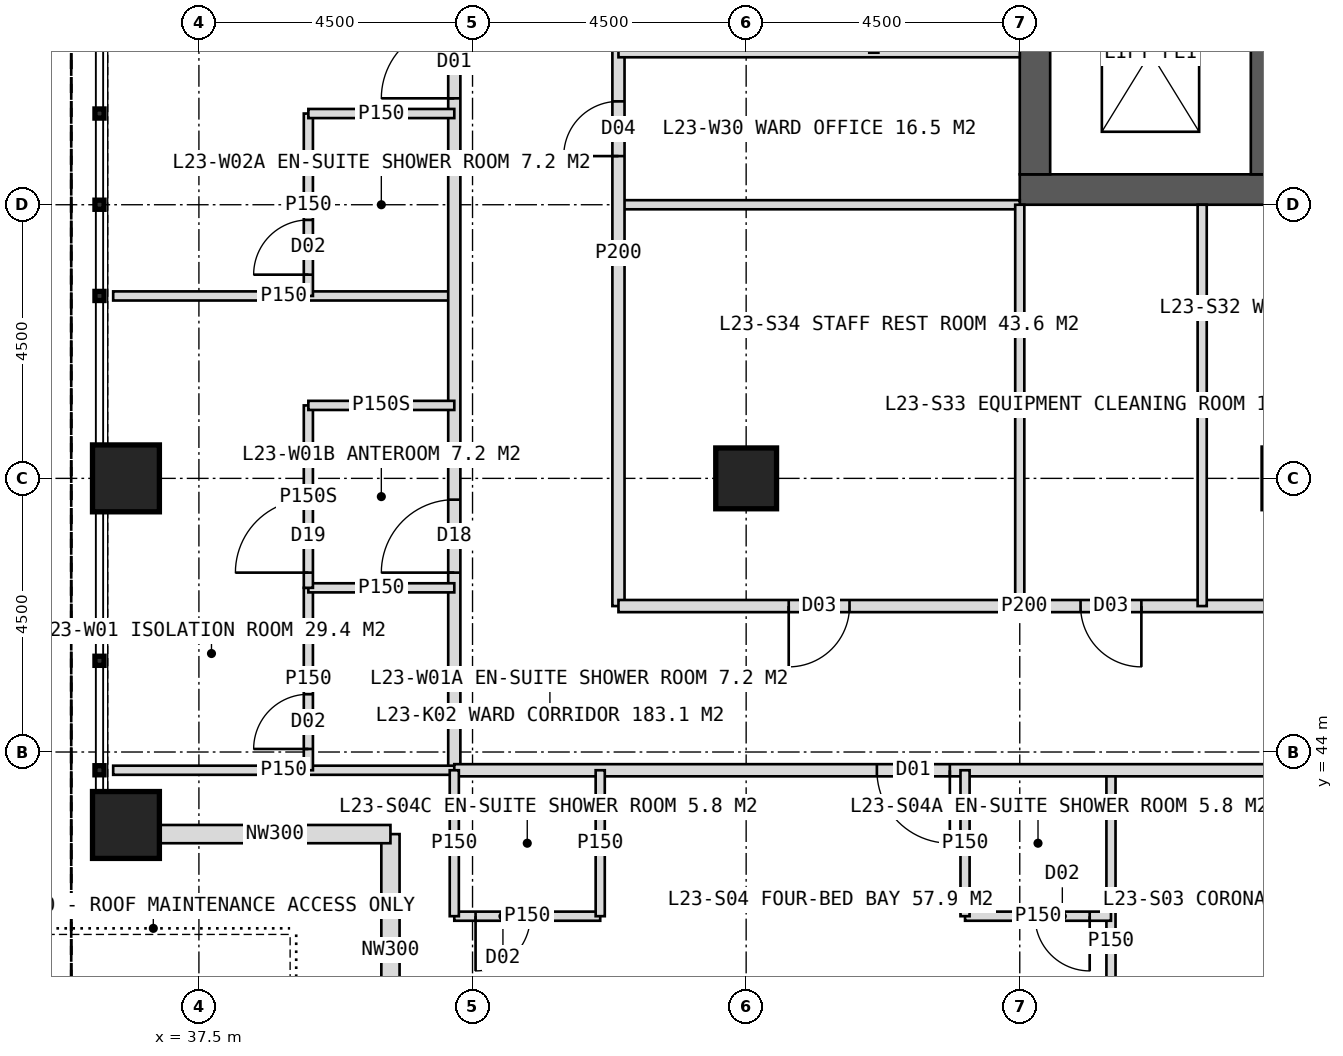
"""IFC4 building model, lengths in metres.
Left out: names, types, materials, properties, quantities, classifications, styles, units other than length and angle.
Written with IfcOpenShell. Run it as: python <this file> out.ifc"""

import sys

from ifc_helpers import new_model, si_unit, direction, frame, frame_2d, origin, origin_2d, place, context, subcontext, project, spatial, rectangle, hollow_rectangle, extrude, element, fill, save


model = new_model("IFC4")
c1 = context("Model", 3, precision=1e-05, world=origin(), true_north=direction((0.0, 1.0)))
c2 = subcontext(c1, "Body", "Model", "MODEL_VIEW")
j1 = project(units=[si_unit("LENGTHUNIT", "METRE"), si_unit("PLANEANGLEUNIT", "RADIAN")], contexts=[c1])
p1 = place(None, origin())
s1 = spatial("IfcSite", under=j1, at=p1, CompositionType="ELEMENT")
p2 = place(p1, origin())
s2 = spatial("IfcBuilding", under=s1, at=p2, CompositionType="ELEMENT")
p3 = place(p2, frame((0.0, 0.0, 100.0)))
s3 = spatial("IfcBuildingStorey", under=s2, at=p3, CompositionType="ELEMENT", Elevation=100.0)
p4 = place(p3, frame((51.0, 53.25, 0.0), z_axis=(0.0, 0.0, 1.0), x_axis=(1.0, 0.0, 0.0)))
e1 = element("IfcWall", 1, at=p4, inside=s3, PredefinedType="SHEAR", context=c2, shape_type="SweptSolid", body=[
    extrude(rectangle(XDim=18.0, YDim=0.5, at=frame_2d((9.0, 0.0))), origin(), (0.0, 0.0, 1.0), 4.0),
])
p5 = place(p4, frame((8.1, 0.0, 0.0)))
e2 = element("IfcOpeningElement", 2, at=p5, cuts=e1, PredefinedType="OPENING", context=c2, shape_type="SweptSolid", body=[
    extrude(rectangle(XDim=1.8, YDim=2.2, at=frame_2d((0.9, 1.1))), frame((0.0, 0.26, 0.0), z_axis=(0.0, -1.0, 0.0), x_axis=(1.0, 0.0, 0.0)), (0.0, 0.0, 1.0), 0.52),
])
p6 = place(p3, frame((51.25, 53.5, 0.0), z_axis=(0.0, 0.0, 1.0), x_axis=(0.0, 1.0, 0.0)))
e3 = element("IfcWall", 3, at=p6, inside=s3, PredefinedType="SHEAR", context=c2, shape_type="SweptSolid", body=[
    extrude(rectangle(XDim=17.0, YDim=0.5, at=frame_2d((8.5, 0.0))), origin(), (0.0, 0.0, 1.0), 4.0),
])
p7 = place(p6, frame((6.0, 0.0, 0.0)))
e4 = element("IfcOpeningElement", 4, at=p7, cuts=e3, PredefinedType="OPENING", context=c2, shape_type="SweptSolid", body=[
    extrude(rectangle(XDim=1.5, YDim=2.2, at=frame_2d((0.75, 1.1))), frame((0.0, 0.26, 0.0), z_axis=(0.0, -1.0, 0.0), x_axis=(1.0, 0.0, 0.0)), (0.0, 0.0, 1.0), 0.52),
])
p8 = place(p3, frame((54.95, 53.5, 0.0), z_axis=(0.0, 0.0, 1.0), x_axis=(0.0, 1.0, 0.0)))
e5 = element("IfcWall", 5, at=p8, inside=s3, PredefinedType="SHEAR", context=c2, shape_type="SweptSolid", body=[
    extrude(rectangle(XDim=17.0, YDim=0.3, at=frame_2d((8.5, 0.0))), origin(), (0.0, 0.0, 1.0), 4.0),
])
p9 = place(p3, frame((46.5, 48.5, 0.0), z_axis=(0.0, 0.0, 1.0), x_axis=(1.0, 0.0, 0.0)))
e6 = element("IfcColumn", 6, at=p9, inside=s3, PredefinedType="COLUMN", context=c2, shape_type="SweptSolid", body=[
    extrude(hollow_rectangle(XDim=1.0, YDim=1.0, WallThickness=0.1, at=origin_2d()), origin(), (0.0, 0.0, 1.0), 4.0),
])
for number, where, z_axis, x_axis in (
    (7, (36.3, 42.8, 0.0), (0.0, 0.0, 1.0), (1.0, 0.0, 0.0)),
    (8, (36.3, 48.5, 0.0), (0.0, 0.0, 1.0), (1.0, 0.0, 0.0)),
):
    element("IfcColumn", number, at=place(p3, frame(where, z_axis=z_axis, x_axis=x_axis)), inside=s3, PredefinedType="COLUMN", context=c2, shape_type="SweptSolid", body=[
        extrude(hollow_rectangle(XDim=1.1, YDim=1.1, WallThickness=0.1, at=origin_2d()), origin(), (0.0, 0.0, 1.0), 4.0),
    ])
for number, where, z_axis, x_axis in (
    (9, (40.65, 38.85, 0.0), (0.0, 0.0, 1.0), (0.0, 1.0, 0.0)),
    (10, (40.65, 42.65, 0.0), (0.0, 0.0, 1.0), (-1.0, 0.0, 0.0)),
):
    element("IfcWall", number, at=place(p3, frame(where, z_axis=z_axis, x_axis=x_axis)), inside=s3, PredefinedType="ELEMENTEDWALL", context=c2, shape_type="SweptSolid", body=[
        extrude(rectangle(XDim=3.8, YDim=0.3, at=frame_2d((1.9, 0.0))), origin(), (0.0, 0.0, 1.0), 4.0),
    ])
p10 = place(p3, frame((41.7, 51.5, 0.0), z_axis=(0.0, 0.0, 1.0), x_axis=(-1.0, 0.0, 0.0)))
e11 = element("IfcWall", 11, at=p10, inside=s3, PredefinedType="PARTITIONING", context=c2, shape_type="SweptSolid", body=[
    extrude(rectangle(XDim=5.61, YDim=0.15, at=frame_2d((2.805, 0.0))), origin(), (0.0, 0.0, 1.0), 3.75),
])
p11 = place(p3, frame((41.7, 43.7, 0.0), z_axis=(0.0, 0.0, 1.0), x_axis=(0.0, 1.0, 0.0)))
e12 = element("IfcWall", 12, at=p11, inside=s3, PredefinedType="PARTITIONING", context=c2, shape_type="SweptSolid", body=[
    extrude(rectangle(XDim=36.6, YDim=0.2, at=frame_2d((18.3, 0.0))), origin(), (0.0, 0.0, 1.0), 3.75),
])
p12 = place(p11, frame((3.25, 0.0, 0.0)))
e13 = element("IfcOpeningElement", 13, at=p12, cuts=e12, PredefinedType="OPENING", context=c2, shape_type="SweptSolid", body=[
    extrude(rectangle(XDim=1.2, YDim=2.2, at=frame_2d((0.6, 1.1))), frame((0.0, 0.11, 0.0), z_axis=(0.0, -1.0, 0.0), x_axis=(1.0, 0.0, 0.0)), (0.0, 0.0, 1.0), 0.22),
])
p13 = place(p11, frame((11.05, 0.0, 0.0)))
e14 = element("IfcOpeningElement", 14, at=p13, cuts=e12, PredefinedType="OPENING", context=c2, shape_type="SweptSolid", body=[
    extrude(rectangle(XDim=1.2, YDim=2.2, at=frame_2d((0.6, 1.1))), frame((0.0, 0.11, 0.0), z_axis=(0.0, -1.0, 0.0), x_axis=(1.0, 0.0, 0.0)), (0.0, 0.0, 1.0), 0.22),
])
p14 = place(p11, frame((21.55, 0.0, 0.0)))
e15 = element("IfcOpeningElement", 15, at=p14, cuts=e12, PredefinedType="OPENING", context=c2, shape_type="SweptSolid", body=[
    extrude(rectangle(XDim=1.2, YDim=2.2, at=frame_2d((0.6, 1.1))), frame((0.0, 0.11, 0.0), z_axis=(0.0, -1.0, 0.0), x_axis=(1.0, 0.0, 0.0)), (0.0, 0.0, 1.0), 0.22),
])
p15 = place(p11, frame((32.05, 0.0, 0.0)))
e16 = element("IfcOpeningElement", 16, at=p15, cuts=e12, PredefinedType="OPENING", context=c2, shape_type="SweptSolid", body=[
    extrude(rectangle(XDim=1.2, YDim=2.2, at=frame_2d((0.6, 1.1))), frame((0.0, 0.11, 0.0), z_axis=(0.0, -1.0, 0.0), x_axis=(1.0, 0.0, 0.0)), (0.0, 0.0, 1.0), 0.22),
])
p16 = place(p3, frame((41.7, 43.7, 0.0), z_axis=(0.0, 0.0, 1.0), x_axis=(-1.0, 0.0, 0.0)))
e17 = element("IfcWall", 17, at=p16, inside=s3, PredefinedType="PARTITIONING", context=c2, shape_type="SweptSolid", body=[
    extrude(rectangle(XDim=5.61, YDim=0.15, at=frame_2d((2.805, 0.0))), origin(), (0.0, 0.0, 1.0), 3.75),
])
p17 = place(p3, frame((39.3, 43.7, 0.0), z_axis=(0.0, 0.0, 1.0), x_axis=(0.0, 1.0, 0.0)))
e18 = element("IfcWall", 18, at=p17, inside=s3, PredefinedType="PARTITIONING", context=c2, shape_type="SweptSolid", body=[
    extrude(rectangle(XDim=3.0, YDim=0.15, at=frame_2d((1.5, 0.0))), origin(), (0.0, 0.0, 1.0), 3.75),
])
p18 = place(p17, frame((0.35, 0.0, 0.0)))
e19 = element("IfcOpeningElement", 19, at=p18, cuts=e18, PredefinedType="OPENING", context=c2, shape_type="SweptSolid", body=[
    extrude(rectangle(XDim=0.9, YDim=2.1, at=frame_2d((0.45, 1.05))), frame((0.0, 0.085, 0.0), z_axis=(0.0, -1.0, 0.0), x_axis=(1.0, 0.0, 0.0)), (0.0, 0.0, 1.0), 0.17),
])
p19 = place(p3, frame((41.7, 46.7, 0.0), z_axis=(0.0, 0.0, 1.0), x_axis=(-1.0, 0.0, 0.0)))
e20 = element("IfcWall", 20, at=p19, inside=s3, PredefinedType="PARTITIONING", context=c2, shape_type="SweptSolid", body=[
    extrude(rectangle(XDim=2.4, YDim=0.15, at=frame_2d((1.2, 0.0))), origin(), (0.0, 0.0, 1.0), 3.75),
])
p20 = place(p3, frame((39.3, 46.7, 0.0), z_axis=(0.0, 0.0, 1.0), x_axis=(0.0, 1.0, 0.0)))
e21 = element("IfcWall", 21, at=p20, inside=s3, PredefinedType="PARTITIONING", context=c2, shape_type="SweptSolid", body=[
    extrude(rectangle(XDim=3.0, YDim=0.15, at=frame_2d((1.5, 0.0))), origin(), (0.0, 0.0, 1.0), 3.75),
])
p21 = place(p20, frame((0.25, 0.0, 0.0)))
e22 = element("IfcOpeningElement", 22, at=p21, cuts=e21, PredefinedType="OPENING", context=c2, shape_type="SweptSolid", body=[
    extrude(rectangle(XDim=1.2, YDim=2.2, at=frame_2d((0.6, 1.1))), frame((0.0, 0.085, 0.0), z_axis=(0.0, -1.0, 0.0), x_axis=(1.0, 0.0, 0.0)), (0.0, 0.0, 1.0), 0.17),
])
p22 = place(p3, frame((41.7, 49.7, 0.0), z_axis=(0.0, 0.0, 1.0), x_axis=(-1.0, 0.0, 0.0)))
e23 = element("IfcWall", 23, at=p22, inside=s3, PredefinedType="PARTITIONING", context=c2, shape_type="SweptSolid", body=[
    extrude(rectangle(XDim=2.4, YDim=0.15, at=frame_2d((1.2, 0.0))), origin(), (0.0, 0.0, 1.0), 3.75),
])
p23 = place(p3, frame((39.3, 51.5, 0.0), z_axis=(0.0, 0.0, 1.0), x_axis=(0.0, 1.0, 0.0)))
e24 = element("IfcWall", 24, at=p23, inside=s3, PredefinedType="PARTITIONING", context=c2, shape_type="SweptSolid", body=[
    extrude(rectangle(XDim=3.0, YDim=0.15, at=frame_2d((1.5, 0.0))), origin(), (0.0, 0.0, 1.0), 3.75),
])
p24 = place(p23, frame((0.35, 0.0, 0.0)))
e25 = element("IfcOpeningElement", 25, at=p24, cuts=e24, PredefinedType="OPENING", context=c2, shape_type="SweptSolid", body=[
    extrude(rectangle(XDim=0.9, YDim=2.1, at=frame_2d((0.45, 1.05))), frame((0.0, 0.085, 0.0), z_axis=(0.0, -1.0, 0.0), x_axis=(1.0, 0.0, 0.0)), (0.0, 0.0, 1.0), 0.17),
])
p25 = place(p3, frame((41.7, 54.5, 0.0), z_axis=(0.0, 0.0, 1.0), x_axis=(-1.0, 0.0, 0.0)))
e26 = element("IfcWall", 26, at=p25, inside=s3, PredefinedType="PARTITIONING", context=c2, shape_type="SweptSolid", body=[
    extrude(rectangle(XDim=2.4, YDim=0.15, at=frame_2d((1.2, 0.0))), origin(), (0.0, 0.0, 1.0), 3.75),
])
p26 = place(p3, frame((51.0, 53.0, 0.0), z_axis=(0.0, 0.0, 1.0), x_axis=(-1.0, 0.0, 0.0)))
e27 = element("IfcWall", 27, at=p26, inside=s3, PredefinedType="PARTITIONING", context=c2, shape_type="SweptSolid", body=[
    extrude(rectangle(XDim=6.6, YDim=0.15, at=frame_2d((3.3, 0.0))), origin(), (0.0, 0.0, 1.0), 3.75),
])
p27 = place(p3, frame((44.4, 46.4, 0.0), z_axis=(0.0, 0.0, 1.0), x_axis=(0.0, 1.0, 0.0)))
e28 = element("IfcWall", 28, at=p27, inside=s3, PredefinedType="PARTITIONING", context=c2, shape_type="SweptSolid", body=[
    extrude(rectangle(XDim=11.6, YDim=0.2, at=frame_2d((5.8, 0.0))), origin(), (0.0, 0.0, 1.0), 3.75),
])
p28 = place(p27, frame((7.4, 0.0, 0.0)))
e29 = element("IfcOpeningElement", 29, at=p28, cuts=e28, PredefinedType="OPENING", context=c2, shape_type="SweptSolid", body=[
    extrude(rectangle(XDim=0.9, YDim=2.1, at=frame_2d((0.45, 1.05))), frame((0.0, 0.11, 0.0), z_axis=(0.0, -1.0, 0.0), x_axis=(1.0, 0.0, 0.0)), (0.0, 0.0, 1.0), 0.22),
])
p29 = place(p27, frame((9.9, 0.0, 0.0)))
e30 = element("IfcOpeningElement", 30, at=p29, cuts=e28, PredefinedType="OPENING", context=c2, shape_type="SweptSolid", body=[
    extrude(rectangle(XDim=0.9, YDim=2.1, at=frame_2d((0.45, 1.05))), frame((0.0, 0.11, 0.0), z_axis=(0.0, -1.0, 0.0), x_axis=(1.0, 0.0, 0.0)), (0.0, 0.0, 1.0), 0.22),
])
p30 = place(p3, frame((51.0, 55.5, 0.0), z_axis=(0.0, 0.0, 1.0), x_axis=(-1.0, 0.0, 0.0)))
e31 = element("IfcWall", 31, at=p30, inside=s3, PredefinedType="PARTITIONING", context=c2, shape_type="SweptSolid", body=[
    extrude(rectangle(XDim=6.6, YDim=0.15, at=frame_2d((3.3, 0.0))), origin(), (0.0, 0.0, 1.0), 3.75),
])
p31 = place(p3, frame((52.5, 43.7, 0.0), z_axis=(0.0, 0.0, 1.0), x_axis=(0.0, -1.0, 0.0)))
e32 = element("IfcWall", 32, at=p31, inside=s3, PredefinedType="PARTITIONING", context=c2, shape_type="SweptSolid", body=[
    extrude(rectangle(XDim=5.61, YDim=0.15, at=frame_2d((2.805, 0.0))), origin(), (0.0, 0.0, 1.0), 3.75),
])
p32 = place(p3, frame((78.3, 43.7, 0.0), z_axis=(0.0, 0.0, 1.0), x_axis=(-1.0, 0.0, 0.0)))
e33 = element("IfcWall", 33, at=p32, inside=s3, PredefinedType="PARTITIONING", context=c2, shape_type="SweptSolid", body=[
    extrude(rectangle(XDim=36.6, YDim=0.2, at=frame_2d((18.3, 0.0))), origin(), (0.0, 0.0, 1.0), 3.75),
])
p33 = place(p32, frame((3.25, 0.0, 0.0)))
e34 = element("IfcOpeningElement", 34, at=p33, cuts=e33, PredefinedType="OPENING", context=c2, shape_type="SweptSolid", body=[
    extrude(rectangle(XDim=1.2, YDim=2.2, at=frame_2d((0.6, 1.1))), frame((0.0, 0.11, 0.0), z_axis=(0.0, -1.0, 0.0), x_axis=(1.0, 0.0, 0.0)), (0.0, 0.0, 1.0), 0.22),
])
p34 = place(p32, frame((11.05, 0.0, 0.0)))
e35 = element("IfcOpeningElement", 35, at=p34, cuts=e33, PredefinedType="OPENING", context=c2, shape_type="SweptSolid", body=[
    extrude(rectangle(XDim=1.2, YDim=2.2, at=frame_2d((0.6, 1.1))), frame((0.0, 0.11, 0.0), z_axis=(0.0, -1.0, 0.0), x_axis=(1.0, 0.0, 0.0)), (0.0, 0.0, 1.0), 0.22),
])
p35 = place(p32, frame((20.05, 0.0, 0.0)))
e36 = element("IfcOpeningElement", 36, at=p35, cuts=e33, PredefinedType="OPENING", context=c2, shape_type="SweptSolid", body=[
    extrude(rectangle(XDim=1.2, YDim=2.2, at=frame_2d((0.6, 1.1))), frame((0.0, 0.11, 0.0), z_axis=(0.0, -1.0, 0.0), x_axis=(1.0, 0.0, 0.0)), (0.0, 0.0, 1.0), 0.22),
])
p36 = place(p32, frame((28.45, 0.0, 0.0)))
e37 = element("IfcOpeningElement", 37, at=p36, cuts=e33, PredefinedType="OPENING", context=c2, shape_type="SweptSolid", body=[
    extrude(rectangle(XDim=1.2, YDim=2.2, at=frame_2d((0.6, 1.1))), frame((0.0, 0.11, 0.0), z_axis=(0.0, -1.0, 0.0), x_axis=(1.0, 0.0, 0.0)), (0.0, 0.0, 1.0), 0.22),
])
p37 = place(p3, frame((52.5, 41.3, 0.0), z_axis=(0.0, 0.0, 1.0), x_axis=(-1.0, 0.0, 0.0)))
e38 = element("IfcWall", 38, at=p37, inside=s3, PredefinedType="PARTITIONING", context=c2, shape_type="SweptSolid", body=[
    extrude(rectangle(XDim=2.4, YDim=0.15, at=frame_2d((1.2, 0.0))), origin(), (0.0, 0.0, 1.0), 3.75),
])
p38 = place(p37, frame((0.35, 0.0, 0.0)))
e39 = element("IfcOpeningElement", 39, at=p38, cuts=e38, PredefinedType="OPENING", context=c2, shape_type="SweptSolid", body=[
    extrude(rectangle(XDim=0.9, YDim=2.1, at=frame_2d((0.45, 1.05))), frame((0.0, 0.085, 0.0), z_axis=(0.0, -1.0, 0.0), x_axis=(1.0, 0.0, 0.0)), (0.0, 0.0, 1.0), 0.17),
])
p39 = place(p3, frame((50.1, 43.7, 0.0), z_axis=(0.0, 0.0, 1.0), x_axis=(0.0, -1.0, 0.0)))
e40 = element("IfcWall", 40, at=p39, inside=s3, PredefinedType="PARTITIONING", context=c2, shape_type="SweptSolid", body=[
    extrude(rectangle(XDim=2.4, YDim=0.15, at=frame_2d((1.2, 0.0))), origin(), (0.0, 0.0, 1.0), 3.75),
])
p40 = place(p3, frame((44.1, 41.3, 0.0), z_axis=(0.0, 0.0, 1.0), x_axis=(-1.0, 0.0, 0.0)))
e41 = element("IfcWall", 41, at=p40, inside=s3, PredefinedType="PARTITIONING", context=c2, shape_type="SweptSolid", body=[
    extrude(rectangle(XDim=2.4, YDim=0.15, at=frame_2d((1.2, 0.0))), origin(), (0.0, 0.0, 1.0), 3.75),
])
p41 = place(p40, frame((1.15, 0.0, 0.0)))
e42 = element("IfcOpeningElement", 42, at=p41, cuts=e41, PredefinedType="OPENING", context=c2, shape_type="SweptSolid", body=[
    extrude(rectangle(XDim=0.9, YDim=2.1, at=frame_2d((0.45, 1.05))), frame((0.0, 0.085, 0.0), z_axis=(0.0, -1.0, 0.0), x_axis=(1.0, 0.0, 0.0)), (0.0, 0.0, 1.0), 0.17),
])
for number, where, z_axis, x_axis in (
    (43, (44.1, 43.7, 0.0), (0.0, 0.0, 1.0), (0.0, -1.0, 0.0)),
    (44, (41.7, 43.7, 0.0), (0.0, 0.0, 1.0), (0.0, -1.0, 0.0)),
):
    element("IfcWall", number, at=place(p3, frame(where, z_axis=z_axis, x_axis=x_axis)), inside=s3, PredefinedType="PARTITIONING", context=c2, shape_type="SweptSolid", body=[
        extrude(rectangle(XDim=2.4, YDim=0.15, at=frame_2d((1.2, 0.0))), origin(), (0.0, 0.0, 1.0), 3.75),
    ])
p42 = place(p3, frame((57.75, 46.4, 0.0), z_axis=(0.0, 0.0, 1.0), x_axis=(-1.0, 0.0, 0.0)))
e45 = element("IfcWall", 45, at=p42, inside=s3, PredefinedType="PARTITIONING", context=c2, shape_type="SweptSolid", body=[
    extrude(rectangle(XDim=13.35, YDim=0.2, at=frame_2d((6.675, 0.0))), origin(), (0.0, 0.0, 1.0), 3.75),
])
p43 = place(p42, frame((1.375, 0.0, 0.0)))
e46 = element("IfcOpeningElement", 46, at=p43, cuts=e45, PredefinedType="OPENING", context=c2, shape_type="SweptSolid", body=[
    extrude(rectangle(XDim=1.0, YDim=2.1, at=frame_2d((0.5, 1.05))), frame((0.0, 0.11, 0.0), z_axis=(0.0, -1.0, 0.0), x_axis=(1.0, 0.0, 0.0)), (0.0, 0.0, 1.0), 0.22),
])
p44 = place(p42, frame((4.75, 0.0, 0.0)))
e47 = element("IfcOpeningElement", 47, at=p44, cuts=e45, PredefinedType="OPENING", context=c2, shape_type="SweptSolid", body=[
    extrude(rectangle(XDim=1.0, YDim=2.1, at=frame_2d((0.5, 1.05))), frame((0.0, 0.11, 0.0), z_axis=(0.0, -1.0, 0.0), x_axis=(1.0, 0.0, 0.0)), (0.0, 0.0, 1.0), 0.22),
])
p45 = place(p42, frame((9.55, 0.0, 0.0)))
e48 = element("IfcOpeningElement", 48, at=p45, cuts=e45, PredefinedType="OPENING", context=c2, shape_type="SweptSolid", body=[
    extrude(rectangle(XDim=1.0, YDim=2.1, at=frame_2d((0.5, 1.05))), frame((0.0, 0.11, 0.0), z_axis=(0.0, -1.0, 0.0), x_axis=(1.0, 0.0, 0.0)), (0.0, 0.0, 1.0), 0.22),
])
for number, where, z_axis, x_axis in (
    (49, (54.0, 53.0, 0.0), (0.0, 0.0, 1.0), (0.0, -1.0, 0.0)),
    (50, (51.0, 53.0, 0.0), (0.0, 0.0, 1.0), (0.0, -1.0, 0.0)),
):
    element("IfcWall", number, at=place(p3, frame(where, z_axis=z_axis, x_axis=x_axis)), inside=s3, PredefinedType="PARTITIONING", context=c2, shape_type="SweptSolid", body=[
        extrude(rectangle(XDim=6.6, YDim=0.15, at=frame_2d((3.3, 0.0))), origin(), (0.0, 0.0, 1.0), 3.75),
    ])
p46 = place(p21, origin())
e51 = element("IfcDoor", 51, at=p46, inside=s3, OperationType="SINGLE_SWING_LEFT", PredefinedType="DOOR", context=c2, shape_type="SweptSolid", body=[
    extrude(rectangle(XDim=1.2, YDim=2.2, at=frame_2d((0.6, 1.1))), frame((0.0, 0.025, 0.0), z_axis=(0.0, -1.0, 0.0), x_axis=(1.0, 0.0, 0.0)), (0.0, 0.0, 1.0), 0.05),
])
fill(e22, e51)
p47 = place(p12, origin())
e52 = element("IfcDoor", 52, at=p47, inside=s3, OperationType="SINGLE_SWING_LEFT", PredefinedType="DOOR", context=c2, shape_type="SweptSolid", body=[
    extrude(rectangle(XDim=1.2, YDim=2.2, at=frame_2d((0.6, 1.1))), frame((0.0, 0.025, 0.0), z_axis=(0.0, -1.0, 0.0), x_axis=(1.0, 0.0, 0.0)), (0.0, 0.0, 1.0), 0.05),
])
fill(e13, e52)
p48 = place(p18, origin())
e53 = element("IfcDoor", 53, at=p48, inside=s3, OperationType="SINGLE_SWING_LEFT", PredefinedType="DOOR", context=c2, shape_type="SweptSolid", body=[
    extrude(rectangle(XDim=0.9, YDim=2.1, at=frame_2d((0.45, 1.05))), frame((0.0, 0.025, 0.0), z_axis=(0.0, -1.0, 0.0), x_axis=(1.0, 0.0, 0.0)), (0.0, 0.0, 1.0), 0.05),
])
fill(e19, e53)
p49 = place(p13, origin())
e54 = element("IfcDoor", 54, at=p49, inside=s3, OperationType="SINGLE_SWING_LEFT", PredefinedType="DOOR", context=c2, shape_type="SweptSolid", body=[
    extrude(rectangle(XDim=1.2, YDim=2.2, at=frame_2d((0.6, 1.1))), frame((0.0, 0.025, 0.0), z_axis=(0.0, -1.0, 0.0), x_axis=(1.0, 0.0, 0.0)), (0.0, 0.0, 1.0), 0.05),
])
fill(e14, e54)
p50 = place(p24, origin())
e55 = element("IfcDoor", 55, at=p50, inside=s3, OperationType="SINGLE_SWING_LEFT", PredefinedType="DOOR", context=c2, shape_type="SweptSolid", body=[
    extrude(rectangle(XDim=0.9, YDim=2.1, at=frame_2d((0.45, 1.05))), frame((0.0, 0.025, 0.0), z_axis=(0.0, -1.0, 0.0), x_axis=(1.0, 0.0, 0.0)), (0.0, 0.0, 1.0), 0.05),
])
fill(e25, e55)
p51 = place(p28, origin())
e56 = element("IfcDoor", 56, at=p51, inside=s3, OperationType="SINGLE_SWING_LEFT", PredefinedType="DOOR", context=c2, shape_type="SweptSolid", body=[
    extrude(rectangle(XDim=0.9, YDim=2.1, at=frame_2d((0.45, 1.05))), frame((0.0, 0.025, 0.0), z_axis=(0.0, -1.0, 0.0), x_axis=(1.0, 0.0, 0.0)), (0.0, 0.0, 1.0), 0.05),
])
fill(e29, e56)
p52 = place(p36, origin())
e57 = element("IfcDoor", 57, at=p52, inside=s3, OperationType="SINGLE_SWING_LEFT", PredefinedType="DOOR", context=c2, shape_type="SweptSolid", body=[
    extrude(rectangle(XDim=1.2, YDim=2.2, at=frame_2d((0.6, 1.1))), frame((0.0, 0.025, 0.0), z_axis=(0.0, -1.0, 0.0), x_axis=(1.0, 0.0, 0.0)), (0.0, 0.0, 1.0), 0.05),
])
fill(e37, e57)
p53 = place(p38, origin())
e58 = element("IfcDoor", 58, at=p53, inside=s3, OperationType="SINGLE_SWING_LEFT", PredefinedType="DOOR", context=c2, shape_type="SweptSolid", body=[
    extrude(rectangle(XDim=0.9, YDim=2.1, at=frame_2d((0.45, 1.05))), frame((0.0, 0.025, 0.0), z_axis=(0.0, -1.0, 0.0), x_axis=(1.0, 0.0, 0.0)), (0.0, 0.0, 1.0), 0.05),
])
fill(e39, e58)
p54 = place(p41, origin())
e59 = element("IfcDoor", 59, at=p54, inside=s3, OperationType="SINGLE_SWING_RIGHT", PredefinedType="DOOR", context=c2, shape_type="SweptSolid", body=[
    extrude(rectangle(XDim=0.9, YDim=2.1, at=frame_2d((0.45, 1.05))), frame((0.0, 0.025, 0.0), z_axis=(0.0, -1.0, 0.0), x_axis=(1.0, 0.0, 0.0)), (0.0, 0.0, 1.0), 0.05),
])
fill(e42, e59)
p55 = place(p44, origin())
e60 = element("IfcDoor", 60, at=p55, inside=s3, OperationType="SINGLE_SWING_LEFT", PredefinedType="DOOR", context=c2, shape_type="SweptSolid", body=[
    extrude(rectangle(XDim=1.0, YDim=2.1, at=frame_2d((0.5, 1.05))), frame((0.0, 0.025, 0.0), z_axis=(0.0, -1.0, 0.0), x_axis=(1.0, 0.0, 0.0)), (0.0, 0.0, 1.0), 0.05),
])
fill(e47, e60)
p56 = place(p45, origin())
e61 = element("IfcDoor", 61, at=p56, inside=s3, OperationType="SINGLE_SWING_RIGHT", PredefinedType="DOOR", context=c2, shape_type="SweptSolid", body=[
    extrude(rectangle(XDim=1.0, YDim=2.1, at=frame_2d((0.5, 1.05))), frame((0.0, 0.025, 0.0), z_axis=(0.0, -1.0, 0.0), x_axis=(1.0, 0.0, 0.0)), (0.0, 0.0, 1.0), 0.05),
])
fill(e48, e61)
save(model, sys.argv[1])
